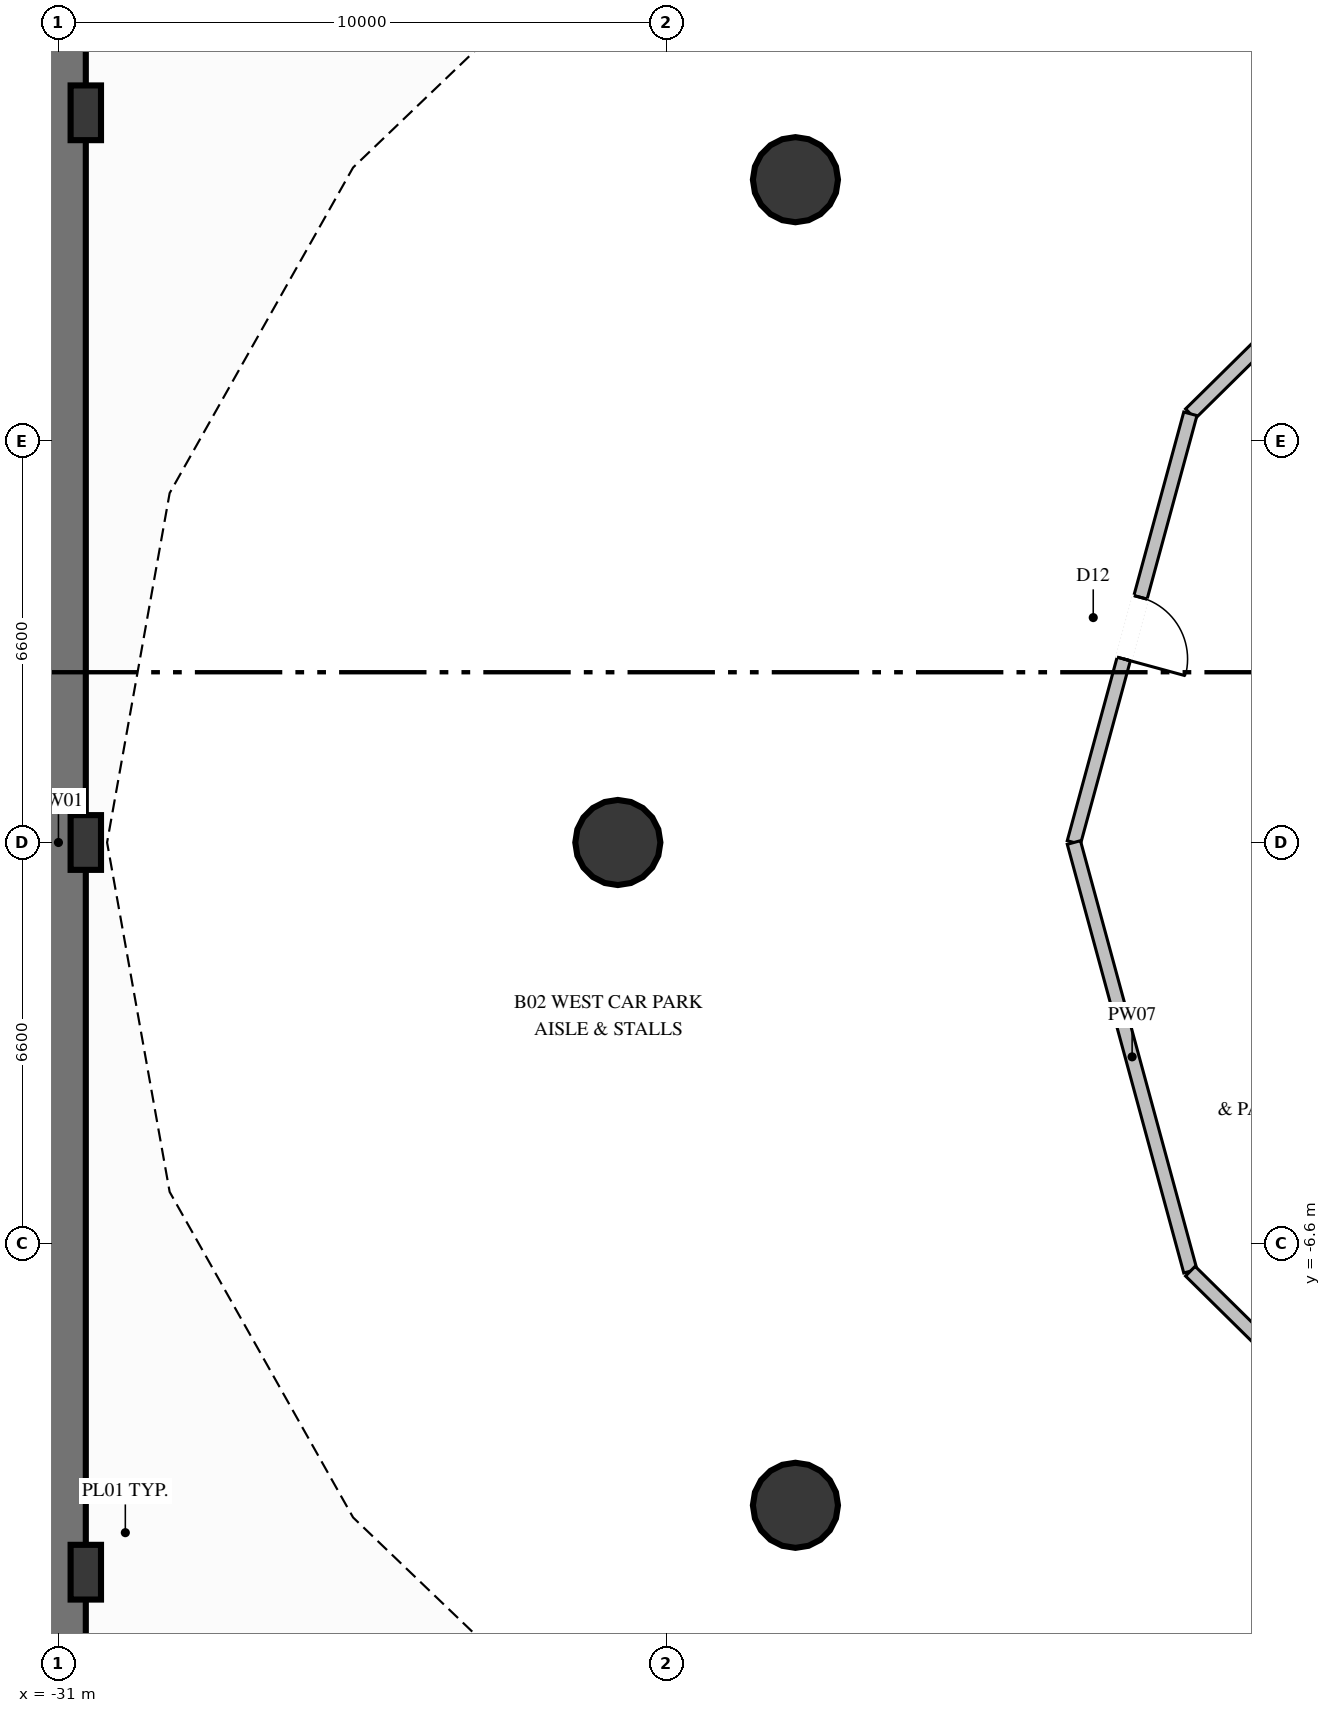
"""IFC4 building model, lengths in metres.
Left out: names, types, materials, properties, quantities, classifications, styles, units other than length and angle.
Written with IfcOpenShell. Run it as: python <this file> out.ifc"""

import sys

from ifc_helpers import new_model, si_unit, direction, frame, frame_2d, origin, origin_2d, place, context, subcontext, project, spatial, rectangle, circle, extrude, element, fill, save


model = new_model("IFC4")
c1 = context("Model", 3, precision=1e-05, world=origin(), true_north=direction((0.0, 1.0)))
c2 = subcontext(c1, "Body", "Model", "MODEL_VIEW")
j1 = project(units=[si_unit("LENGTHUNIT", "METRE"), si_unit("PLANEANGLEUNIT", "RADIAN")], contexts=[c1])
p1 = place(None, origin())
s1 = spatial("IfcSite", under=j1, at=p1, CompositionType="ELEMENT")
p2 = place(p1, origin())
s2 = spatial("IfcBuilding", under=s1, at=p2, CompositionType="ELEMENT")
p3 = place(p2, frame((0.0, 0.0, -9.6)))
s3 = spatial("IfcBuildingStorey", under=s2, at=p3, CompositionType="ELEMENT", Elevation=-9.6)
p4 = place(p3, frame((-31.0, 22.55, 0.0), z_axis=(0.0, 0.0, 1.0), x_axis=(0.0, -1.0, 0.0)))
e1 = element("IfcWall", 1, at=p4, inside=s3, PredefinedType="SHEAR", context=c2, shape_type="SweptSolid", body=[
    extrude(rectangle(XDim=45.1, YDim=0.9, at=frame_2d((22.55, 0.0))), origin(), (0.0, 0.0, 1.0), 4.8),
])
for number, where, z_axis, x_axis in (
    (2, (-30.55, -12.0, 0.0), (0.0, 0.0, 1.0), (1.0, 0.0, 0.0)),
    (3, (-30.55, 0.0, 0.0), (0.0, 0.0, 1.0), (1.0, 0.0, 0.0)),
    (4, (-30.55, 12.0, 0.0), (0.0, 0.0, 1.0), (1.0, 0.0, 0.0)),
):
    element("IfcColumn", number, at=place(p3, frame(where, z_axis=z_axis, x_axis=x_axis)), inside=s3, PredefinedType="PILASTER", context=c2, shape_type="SweptSolid", body=[
        extrude(rectangle(XDim=0.5, YDim=0.9, at=origin_2d()), origin(), (0.0, 0.0, 1.0), 4.8),
    ])
for number, where, z_axis, x_axis in (
    (5, (-18.879, 10.9, 0.0), (0.0, 0.0, 1.0), (1.0, 0.0, 0.0)),
    (6, (-21.8, 0.0, 0.0), (0.0, 0.0, 1.0), (1.0, 0.0, 0.0)),
    (7, (-18.879, -10.9, 0.0), (0.0, 0.0, 1.0), (1.0, 0.0, 0.0)),
):
    element("IfcColumn", number, at=place(p3, frame(where, z_axis=z_axis, x_axis=x_axis)), inside=s3, PredefinedType="COLUMN", context=c2, shape_type="SweptSolid", body=[
        extrude(circle(Radius=0.7, at=origin_2d()), origin(), (0.0, 0.0, 1.0), 4.8),
    ])
p5 = place(p3, frame((-7.15, 12.211, 0.0), z_axis=(0.0, 0.0, 1.0), x_axis=(-0.712071304345, -0.702107155303, 0.0)))
e8 = element("IfcWall", 8, at=p5, inside=s3, PredefinedType="PARTITIONING", context=c2, shape_type="SweptSolid", body=[
    extrude(rectangle(XDim=7.351, YDim=0.225, at=frame_2d((3.675, 0.0))), origin(), (0.0, 0.0, 1.0), 4.46),
])
p6 = place(p3, frame((-12.384, 7.05, 0.0), z_axis=(0.0, 0.0, 1.0), x_axis=(-0.262260528785, -0.964997106235, 0.0)))
e9 = element("IfcWall", 9, at=p6, inside=s3, PredefinedType="PARTITIONING", context=c2, shape_type="SweptSolid", body=[
    extrude(rectangle(XDim=7.306, YDim=0.225, at=frame_2d((3.653, 0.0))), origin(), (0.0, 0.0, 1.0), 4.46),
])
p7 = place(p6, frame((3.128, 0.0, 0.0)))
e10 = element("IfcOpeningElement", 10, at=p7, cuts=e9, PredefinedType="OPENING", context=c2, shape_type="SweptSolid", body=[
    extrude(rectangle(XDim=1.05, YDim=2.15, at=frame_2d((0.525, 1.075))), frame((0.0, 0.123, 0.0), z_axis=(0.0, -1.0, 0.0), x_axis=(1.0, 0.0, 0.0)), (0.0, 0.0, 1.0), 0.245),
])
p8 = place(p3, frame((-14.3, 0.0, 0.0), z_axis=(0.0, 0.0, 1.0), x_axis=(0.262260528785, -0.964997106235, 0.0)))
e11 = element("IfcWall", 11, at=p8, inside=s3, PredefinedType="PARTITIONING", context=c2, shape_type="SweptSolid", body=[
    extrude(rectangle(XDim=7.306, YDim=0.225, at=frame_2d((3.653, 0.0))), origin(), (0.0, 0.0, 1.0), 4.46),
])
p9 = place(p3, frame((-12.384, -7.05, 0.0), z_axis=(0.0, 0.0, 1.0), x_axis=(0.712071304345, -0.702107155303, 0.0)))
e12 = element("IfcWall", 12, at=p9, inside=s3, PredefinedType="PARTITIONING", context=c2, shape_type="SweptSolid", body=[
    extrude(rectangle(XDim=7.351, YDim=0.225, at=frame_2d((3.675, 0.0))), origin(), (0.0, 0.0, 1.0), 4.46),
])
p10 = place(p7, origin())
e13 = element("IfcDoor", 13, at=p10, inside=s3, OperationType="SINGLE_SWING_RIGHT", PredefinedType="DOOR", context=c2, shape_type="SweptSolid", body=[
    extrude(rectangle(XDim=1.05, YDim=2.15, at=frame_2d((0.525, 1.075))), frame((0.0, 0.025, 0.0), z_axis=(0.0, -1.0, 0.0), x_axis=(1.0, 0.0, 0.0)), (0.0, 0.0, 1.0), 0.05),
])
fill(e10, e13)
save(model, sys.argv[1])
